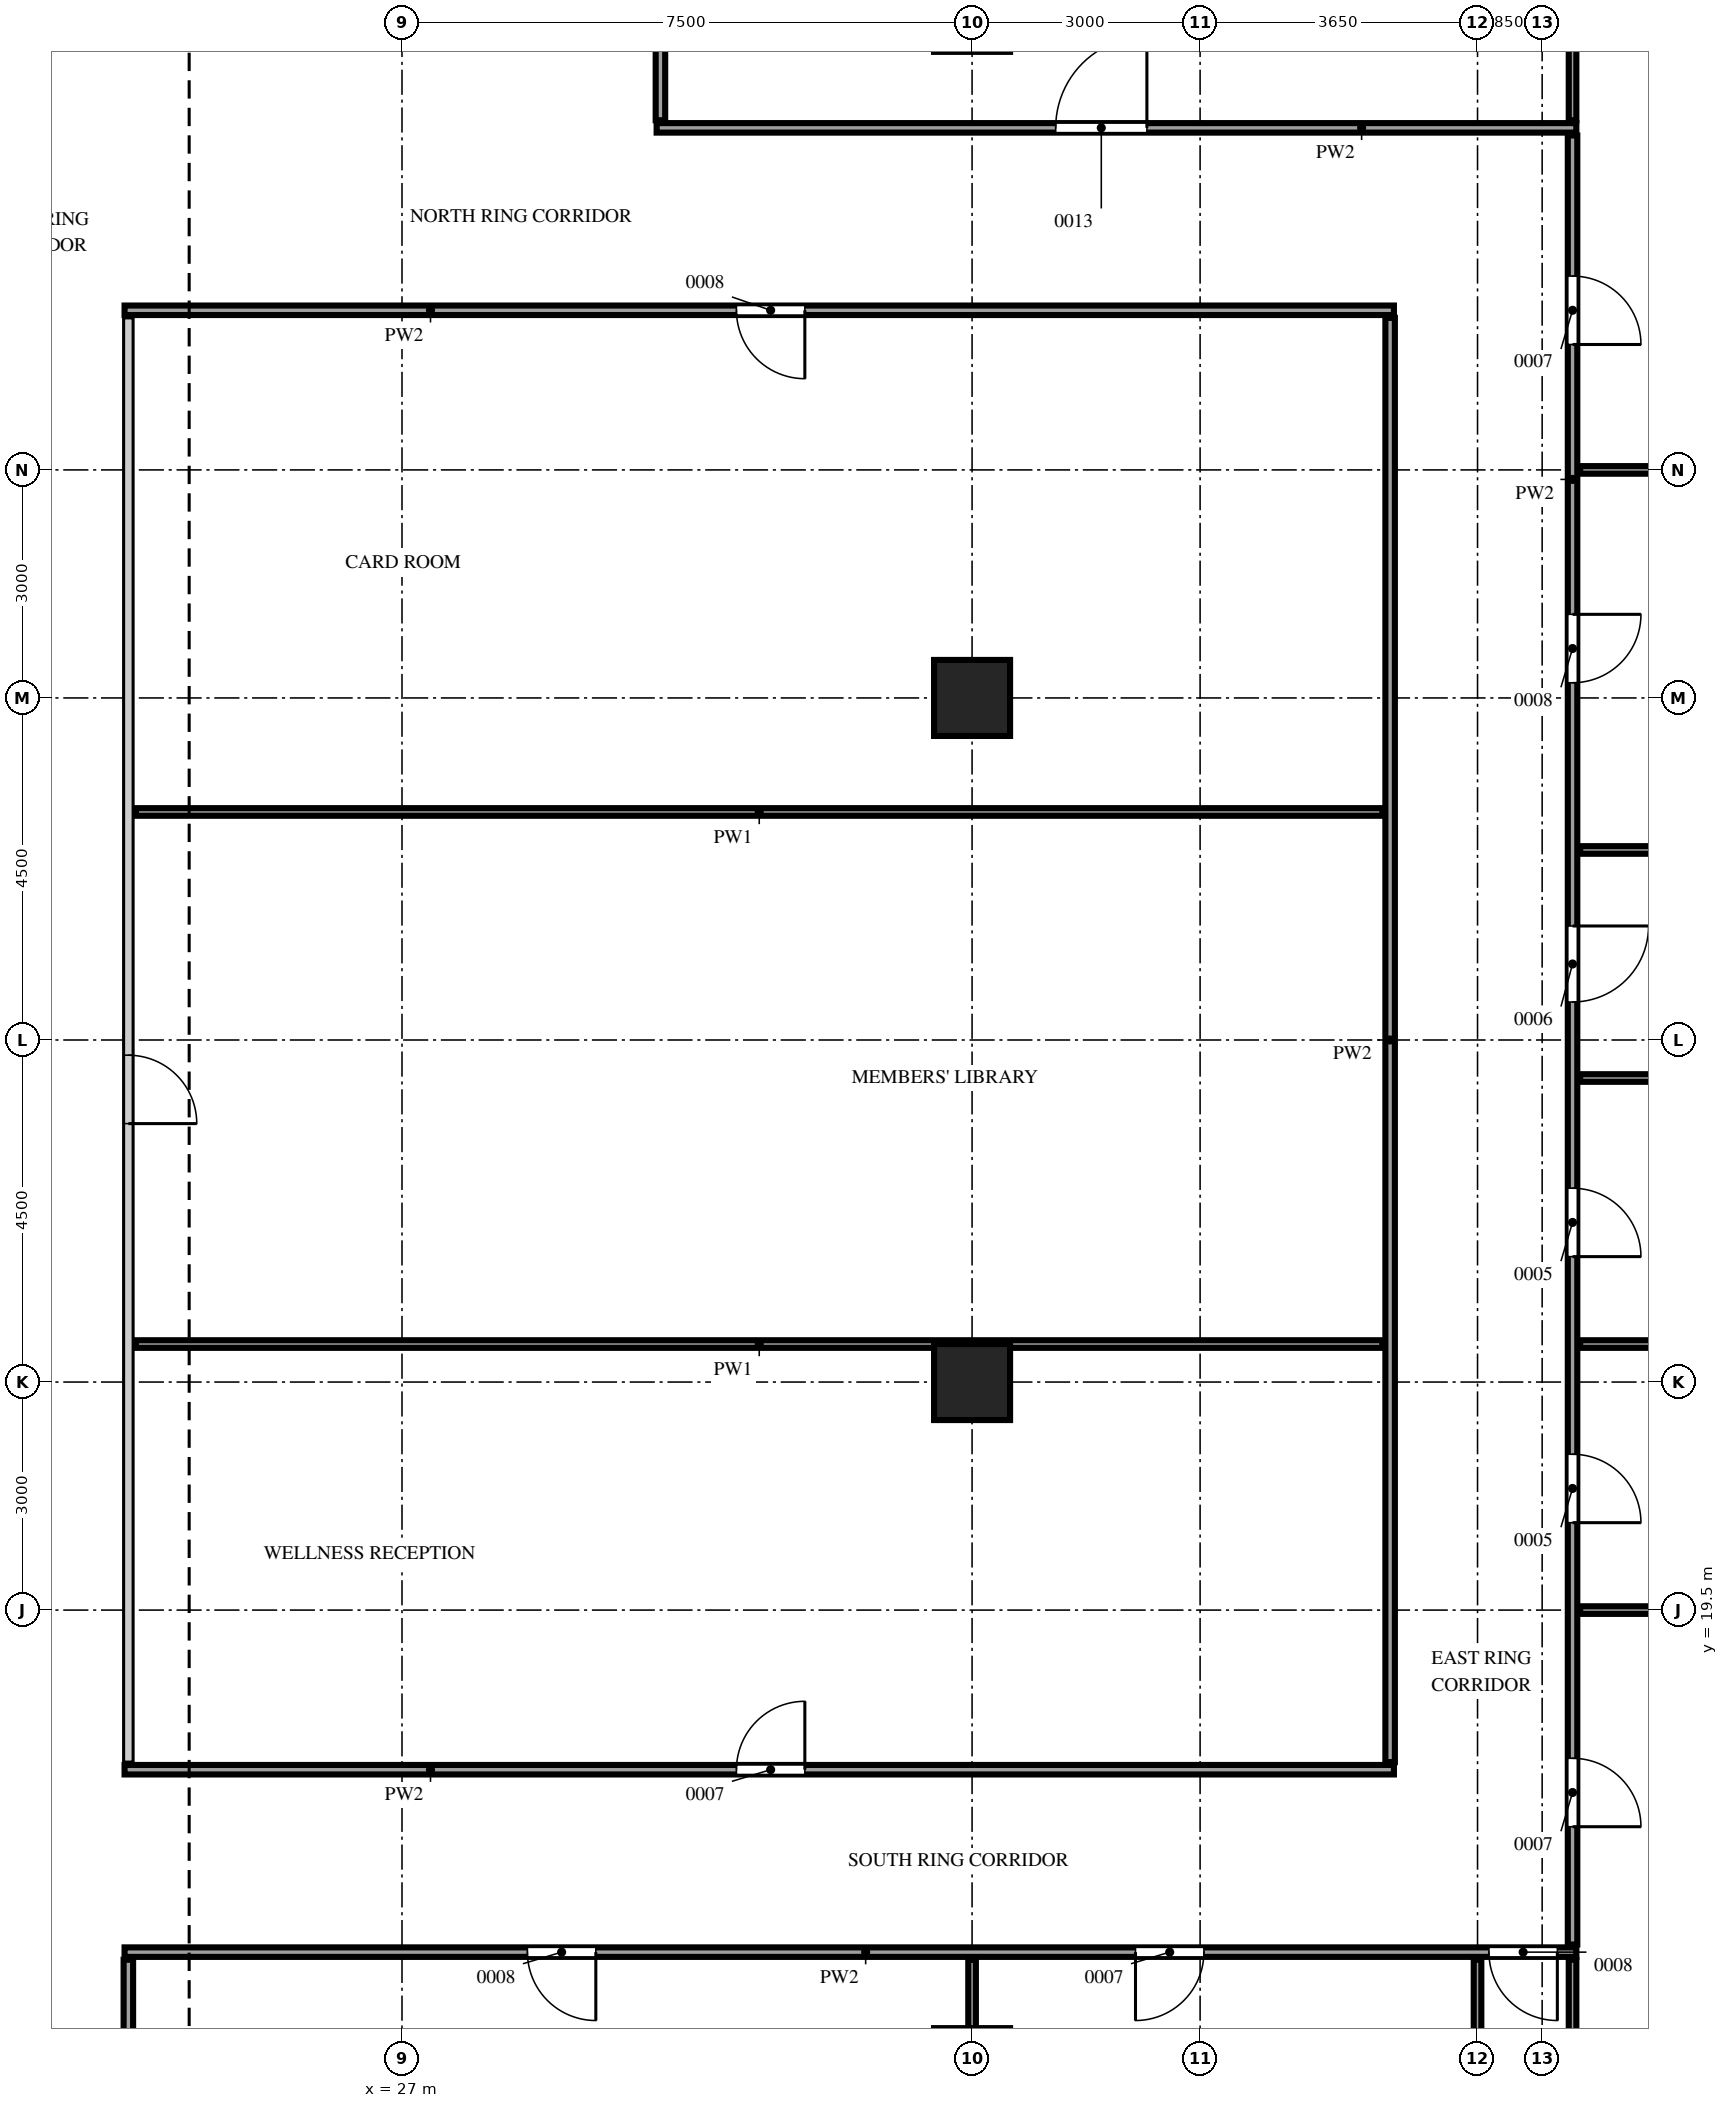
"""IFC4 building model, lengths in metres.
Left out: names, types, materials, properties, quantities, classifications, styles, units other than length and angle.
Written with IfcOpenShell. Run it as: python <this file> out.ifc"""

import sys

from ifc_helpers import new_model, si_unit, direction, frame, frame_2d, origin, origin_2d, place, context, subcontext, project, spatial, rectangle, extrude, source, transform, mapped, element, fill, save


model = new_model("IFC4")
c1 = context("Model", 3, precision=1e-05, world=origin(), true_north=direction((0.0, 1.0)))
c2 = subcontext(c1, "Body", "Model", "MODEL_VIEW")
j1 = project(units=[si_unit("LENGTHUNIT", "METRE"), si_unit("PLANEANGLEUNIT", "RADIAN")], contexts=[c1])
p1 = place(None, origin())
s1 = spatial("IfcSite", under=j1, at=p1, CompositionType="ELEMENT")
p2 = place(p1, origin())
s2 = spatial("IfcBuilding", under=s1, at=p2, CompositionType="ELEMENT")
p3 = place(p2, frame((0.0, 0.0, 298.2)))
s3 = spatial("IfcBuildingStorey", under=s2, at=p3, CompositionType="ELEMENT", Elevation=298.2)
m1 = source(origin(), c2, "Body", "SweptSolid", [
    extrude(rectangle(XDim=1.0, YDim=1.0, at=origin_2d()), origin(), (0.0, 0.0, 1.0), 3.75),
])
for number, where, z_axis, x_axis in (
    (1, (34.5, 22.5, 0.0), (0.0, 0.0, 1.0), (1.0, 0.0, 0.0)),
    (2, (34.5, 31.5, 0.0), (0.0, 0.0, 1.0), (1.0, 0.0, 0.0)),
):
    element("IfcColumn", number, at=place(p3, frame(where, z_axis=z_axis, x_axis=x_axis)), inside=s3, PredefinedType="COLUMN", context=c2, shape_type="MappedRepresentation", body=[
        mapped(m1, transform((0.0, 0.0, 0.0))),
    ])
m2 = source(origin(), c2, "Body", "SweptSolid", [
    extrude(rectangle(XDim=8.75, YDim=0.125, at=frame_2d((4.375, 0.0))), origin(), (0.0, 0.0, 1.0), 3.8),
])
p4 = place(p3, frame((23.4, 6.15, 0.0), z_axis=(0.0, 0.0, 1.0), x_axis=(0.0, 1.0, 0.0)))
e3 = element("IfcWall", 3, at=p4, inside=s3, PredefinedType="PARTITIONING", context=c2, shape_type="MappedRepresentation", body=[
    mapped(m2, transform((0.0, 0.0, 0.0))),
])
m3 = source(origin(), c2, "Body", "SweptSolid", [
    extrude(rectangle(XDim=8.75, YDim=0.1, at=frame_2d((4.375, 0.0))), origin(), (0.0, 0.0, 1.0), 3.35),
])
for number, where, z_axis, x_axis in (
    (4, (34.5, 6.15, 0.0), (0.0, 0.0, 1.0), (0.0, 1.0, 0.0)),
    (5, (41.15, 6.15, 0.0), (0.0, 0.0, 1.0), (0.0, 1.0, 0.0)),
):
    element("IfcWall", number, at=place(p3, frame(where, z_axis=z_axis, x_axis=x_axis)), inside=s3, PredefinedType="PARTITIONING", context=c2, shape_type="MappedRepresentation", body=[
        mapped(m3, transform((0.0, 0.0, 0.0))),
    ])
m4 = source(origin(), c2, "Body", "SweptSolid", [
    extrude(rectangle(XDim=2.75, YDim=0.1, at=frame_2d((1.375, 0.0))), origin(), (0.0, 0.0, 1.0), 3.8),
])
p5 = place(p3, frame((42.4, 12.15, 0.0), z_axis=(0.0, 0.0, 1.0), x_axis=(0.0, 1.0, 0.0)))
e6 = element("IfcWall", 6, at=p5, inside=s3, PredefinedType="PARTITIONING", context=c2, shape_type="MappedRepresentation", body=[
    mapped(m4, transform((0.0, 0.0, 0.0))),
])
m5 = source(origin(), c2, "Body", "SweptSolid", [
    extrude(rectangle(XDim=19.1, YDim=0.125, at=frame_2d((9.55, 0.0))), origin(), (0.0, 0.0, 1.0), 3.8),
])
p6 = place(p3, frame((23.35, 15.0, 0.0), z_axis=(0.0, 0.0, 1.0), x_axis=(1.0, 0.0, 0.0)))
e7 = element("IfcWall", 7, at=p6, inside=s3, PredefinedType="PARTITIONING", context=c2, shape_type="MappedRepresentation", body=[
    mapped(m5, transform((0.0, 0.0, 0.0))),
])
m6 = source(origin(), c2, "Body", "SweptSolid", [
    extrude(rectangle(XDim=0.9, YDim=2.1, at=frame_2d((0.45, 1.05))), frame((0.0, 0.073, 0.0), z_axis=(0.0, -1.0, 0.0), x_axis=(1.0, 0.0, 0.0)), (0.0, 0.0, 1.0), 0.145),
])
p7 = place(p6, frame((5.3, 0.0, 0.0)))
e8 = element("IfcOpeningElement", 8, at=p7, cuts=e7, PredefinedType="OPENING", context=c2, shape_type="MappedRepresentation", body=[
    mapped(m6, transform((0.0, 0.0, 0.0))),
])
p8 = place(p6, frame((13.3, 0.0, 0.0)))
e9 = element("IfcOpeningElement", 9, at=p8, cuts=e7, PredefinedType="OPENING", context=c2, shape_type="MappedRepresentation", body=[
    mapped(m6, transform((0.0, 0.0, 0.0))),
])
p9 = place(p6, frame((17.95, 0.0, 0.0)))
e10 = element("IfcOpeningElement", 10, at=p9, cuts=e7, PredefinedType="OPENING", context=c2, shape_type="MappedRepresentation", body=[
    mapped(m6, transform((0.0, 0.0, 0.0))),
])
m7 = source(origin(), c2, "Body", "SweptSolid", [
    extrude(rectangle(XDim=23.8, YDim=0.125, at=frame_2d((11.9, 0.0))), origin(), (0.0, 0.0, 1.0), 3.8),
])
p10 = place(p3, frame((42.4, 15.1, 0.0), z_axis=(0.0, 0.0, 1.0), x_axis=(0.0, 1.0, 0.0)))
e11 = element("IfcWall", 11, at=p10, inside=s3, PredefinedType="PARTITIONING", context=c2, shape_type="MappedRepresentation", body=[
    mapped(m7, transform((0.0, 0.0, 0.0))),
])
p11 = place(p10, frame((1.55, 0.0, 0.0)))
e12 = element("IfcOpeningElement", 12, at=p11, cuts=e11, PredefinedType="OPENING", context=c2, shape_type="MappedRepresentation", body=[
    mapped(m6, transform((0.0, 0.0, 0.0))),
])
p12 = place(p10, frame((5.55, 0.0, 0.0)))
e13 = element("IfcOpeningElement", 13, at=p12, cuts=e11, PredefinedType="OPENING", context=c2, shape_type="MappedRepresentation", body=[
    mapped(m6, transform((0.0, 0.0, 0.0))),
])
p13 = place(p10, frame((9.05, 0.0, 0.0)))
e14 = element("IfcOpeningElement", 14, at=p13, cuts=e11, PredefinedType="OPENING", context=c2, shape_type="MappedRepresentation", body=[
    mapped(m6, transform((0.0, 0.0, 0.0))),
])
m8 = source(origin(), c2, "Body", "SweptSolid", [
    extrude(rectangle(XDim=1.0, YDim=2.1, at=frame_2d((0.5, 1.05))), frame((0.0, 0.073, 0.0), z_axis=(0.0, -1.0, 0.0), x_axis=(1.0, 0.0, 0.0)), (0.0, 0.0, 1.0), 0.145),
])
p14 = place(p10, frame((12.4, 0.0, 0.0)))
e15 = element("IfcOpeningElement", 15, at=p14, cuts=e11, PredefinedType="OPENING", context=c2, shape_type="MappedRepresentation", body=[
    mapped(m8, transform((0.0, 0.0, 0.0))),
])
p15 = place(p10, frame((16.6, 0.0, 0.0)))
e16 = element("IfcOpeningElement", 16, at=p15, cuts=e11, PredefinedType="OPENING", context=c2, shape_type="MappedRepresentation", body=[
    mapped(m6, transform((0.0, 0.0, 0.0))),
])
p16 = place(p10, frame((21.05, 0.0, 0.0)))
e17 = element("IfcOpeningElement", 17, at=p16, cuts=e11, PredefinedType="OPENING", context=c2, shape_type="MappedRepresentation", body=[
    mapped(m6, transform((0.0, 0.0, 0.0))),
])
m9 = source(origin(), c2, "Body", "SweptSolid", [
    extrude(rectangle(XDim=16.7, YDim=0.125, at=frame_2d((8.35, 0.0))), origin(), (0.0, 0.0, 1.0), 3.8),
])
p17 = place(p3, frame((23.35, 17.4, 0.0), z_axis=(0.0, 0.0, 1.0), x_axis=(1.0, 0.0, 0.0)))
e18 = element("IfcWall", 18, at=p17, inside=s3, PredefinedType="PARTITIONING", context=c2, shape_type="MappedRepresentation", body=[
    mapped(m9, transform((0.0, 0.0, 0.0))),
])
p18 = place(p17, frame((8.05, 0.0, 0.0)))
e19 = element("IfcOpeningElement", 19, at=p18, cuts=e18, PredefinedType="OPENING", context=c2, shape_type="MappedRepresentation", body=[
    mapped(m6, transform((0.0, 0.0, 0.0))),
])
m10 = source(origin(), c2, "Body", "SweptSolid", [
    extrude(rectangle(XDim=19.0, YDim=0.125, at=frame_2d((9.5, 0.0))), origin(), (0.0, 0.0, 1.0), 3.8),
])
p19 = place(p3, frame((23.4, 17.5, 0.0), z_axis=(0.0, 0.0, 1.0), x_axis=(0.0, 1.0, 0.0)))
e20 = element("IfcWall", 20, at=p19, inside=s3, PredefinedType="PARTITIONING", context=c2, shape_type="MappedRepresentation", body=[
    mapped(m10, transform((0.0, 0.0, 0.0))),
])
p20 = place(p19, frame((8.4, 0.0, 0.0)))
e21 = element("IfcOpeningElement", 21, at=p20, cuts=e20, PredefinedType="OPENING", context=c2, shape_type="MappedRepresentation", body=[
    mapped(m6, transform((0.0, 0.0, 0.0))),
])
p21 = place(p3, frame((40.0, 17.5, 0.0), z_axis=(0.0, 0.0, 1.0), x_axis=(0.0, 1.0, 0.0)))
e22 = element("IfcWall", 22, at=p21, inside=s3, PredefinedType="PARTITIONING", context=c2, shape_type="MappedRepresentation", body=[
    mapped(m10, transform((0.0, 0.0, 0.0))),
])
m11 = source(origin(), c2, "Body", "SweptSolid", [
    extrude(rectangle(XDim=5.35, YDim=0.1, at=frame_2d((2.675, 0.0))), origin(), (0.0, 0.0, 1.0), 3.8),
])
p22 = place(p3, frame((42.5, 19.5, 0.0), z_axis=(0.0, 0.0, 1.0), x_axis=(1.0, 0.0, 0.0)))
e23 = element("IfcWall", 23, at=p22, inside=s3, PredefinedType="PARTITIONING", context=c2, shape_type="MappedRepresentation", body=[
    mapped(m11, transform((0.0, 0.0, 0.0))),
])
m12 = source(origin(), c2, "Body", "SweptSolid", [
    extrude(rectangle(XDim=16.4, YDim=0.1, at=frame_2d((8.2, 0.0))), origin(), (0.0, 0.0, 1.0), 3.8),
])
p23 = place(p3, frame((23.5, 23.0, 0.0), z_axis=(0.0, 0.0, 1.0), x_axis=(1.0, 0.0, 0.0)))
e24 = element("IfcWall", 24, at=p23, inside=s3, PredefinedType="PARTITIONING", context=c2, shape_type="MappedRepresentation", body=[
    mapped(m12, transform((0.0, 0.0, 0.0))),
])
for number, where, z_axis, x_axis in (
    (25, (42.5, 23.0, 0.0), (0.0, 0.0, 1.0), (1.0, 0.0, 0.0)),
    (26, (42.5, 26.5, 0.0), (0.0, 0.0, 1.0), (1.0, 0.0, 0.0)),
    (27, (42.5, 29.5, 0.0), (0.0, 0.0, 1.0), (1.0, 0.0, 0.0)),
):
    element("IfcWall", number, at=place(p3, frame(where, z_axis=z_axis, x_axis=x_axis)), inside=s3, PredefinedType="PARTITIONING", context=c2, shape_type="MappedRepresentation", body=[
        mapped(m11, transform((0.0, 0.0, 0.0))),
    ])
p24 = place(p3, frame((23.5, 30.0, 0.0), z_axis=(0.0, 0.0, 1.0), x_axis=(1.0, 0.0, 0.0)))
e28 = element("IfcWall", 28, at=p24, inside=s3, PredefinedType="PARTITIONING", context=c2, shape_type="MappedRepresentation", body=[
    mapped(m12, transform((0.0, 0.0, 0.0))),
])
p25 = place(p3, frame((42.5, 34.5, 0.0), z_axis=(0.0, 0.0, 1.0), x_axis=(1.0, 0.0, 0.0)))
e29 = element("IfcWall", 29, at=p25, inside=s3, PredefinedType="PARTITIONING", context=c2, shape_type="MappedRepresentation", body=[
    mapped(m11, transform((0.0, 0.0, 0.0))),
])
p26 = place(p3, frame((23.35, 36.6, 0.0), z_axis=(0.0, 0.0, 1.0), x_axis=(1.0, 0.0, 0.0)))
e30 = element("IfcWall", 30, at=p26, inside=s3, PredefinedType="PARTITIONING", context=c2, shape_type="MappedRepresentation", body=[
    mapped(m9, transform((0.0, 0.0, 0.0))),
])
p27 = place(p26, frame((8.05, 0.0, 0.0)))
e31 = element("IfcOpeningElement", 31, at=p27, cuts=e30, PredefinedType="OPENING", context=c2, shape_type="MappedRepresentation", body=[
    mapped(m6, transform((0.0, 0.0, 0.0))),
])
m13 = source(origin(), c2, "Body", "SweptSolid", [
    extrude(rectangle(XDim=12.1, YDim=0.125, at=frame_2d((6.05, 0.0))), origin(), (0.0, 0.0, 1.0), 3.8),
])
p28 = place(p3, frame((30.35, 39.0, 0.0), z_axis=(0.0, 0.0, 1.0), x_axis=(1.0, 0.0, 0.0)))
e32 = element("IfcWall", 32, at=p28, inside=s3, PredefinedType="PARTITIONING", context=c2, shape_type="MappedRepresentation", body=[
    mapped(m13, transform((0.0, 0.0, 0.0))),
])
m14 = source(origin(), c2, "Body", "SweptSolid", [
    extrude(rectangle(XDim=1.2, YDim=2.1, at=frame_2d((0.6, 1.05))), frame((0.0, 0.073, 0.0), z_axis=(0.0, -1.0, 0.0), x_axis=(1.0, 0.0, 0.0)), (0.0, 0.0, 1.0), 0.145),
])
p29 = place(p28, frame((5.25, 0.0, 0.0)))
e33 = element("IfcOpeningElement", 33, at=p29, cuts=e32, PredefinedType="OPENING", context=c2, shape_type="MappedRepresentation", body=[
    mapped(m14, transform((0.0, 0.0, 0.0))),
])
p30 = place(p3, frame((30.4, 39.1, 0.0), z_axis=(0.0, 0.0, 1.0), x_axis=(0.0, 1.0, 0.0)))
e34 = element("IfcWall", 34, at=p30, inside=s3, PredefinedType="PARTITIONING", context=c2, shape_type="MappedRepresentation", body=[
    mapped(m2, transform((0.0, 0.0, 0.0))),
])
p31 = place(p3, frame((42.4, 39.1, 0.0), z_axis=(0.0, 0.0, 1.0), x_axis=(0.0, 1.0, 0.0)))
e35 = element("IfcWall", 35, at=p31, inside=s3, PredefinedType="PARTITIONING", context=c2, shape_type="MappedRepresentation", body=[
    mapped(m4, transform((0.0, 0.0, 0.0))),
])
m15 = source(origin(), c2, "Body", "SweptSolid", [
    extrude(rectangle(XDim=0.9, YDim=2.1, at=frame_2d((0.45, 1.05))), frame((0.0, 0.025, 0.0), z_axis=(0.0, -1.0, 0.0), x_axis=(1.0, 0.0, 0.0)), (0.0, 0.0, 1.0), 0.05),
])
p32 = place(p7, origin())
e36 = element("IfcDoor", 36, at=p32, inside=s3, OperationType="SINGLE_SWING_RIGHT", PredefinedType="DOOR", context=c2, shape_type="MappedRepresentation", body=[
    mapped(m15, transform((0.0, 0.0, 0.0))),
])
fill(e8, e36)
p33 = place(p8, origin())
e37 = element("IfcDoor", 37, at=p33, inside=s3, OperationType="SINGLE_SWING_LEFT", PredefinedType="DOOR", context=c2, shape_type="MappedRepresentation", body=[
    mapped(m15, transform((0.0, 0.0, 0.0))),
])
fill(e9, e37)
p34 = place(p9, origin())
e38 = element("IfcDoor", 38, at=p34, inside=s3, OperationType="SINGLE_SWING_RIGHT", PredefinedType="DOOR", context=c2, shape_type="MappedRepresentation", body=[
    mapped(m15, transform((0.0, 0.0, 0.0))),
])
fill(e10, e38)
p35 = place(p11, origin())
e39 = element("IfcDoor", 39, at=p35, inside=s3, OperationType="SINGLE_SWING_LEFT", PredefinedType="DOOR", context=c2, shape_type="MappedRepresentation", body=[
    mapped(m15, transform((0.0, 0.0, 0.0))),
])
fill(e12, e39)
p36 = place(p12, origin())
e40 = element("IfcDoor", 40, at=p36, inside=s3, OperationType="SINGLE_SWING_LEFT", PredefinedType="DOOR", context=c2, shape_type="MappedRepresentation", body=[
    mapped(m15, transform((0.0, 0.0, 0.0))),
])
fill(e13, e40)
p37 = place(p13, origin())
e41 = element("IfcDoor", 41, at=p37, inside=s3, OperationType="SINGLE_SWING_LEFT", PredefinedType="DOOR", context=c2, shape_type="MappedRepresentation", body=[
    mapped(m15, transform((0.0, 0.0, 0.0))),
])
fill(e14, e41)
m16 = source(origin(), c2, "Body", "SweptSolid", [
    extrude(rectangle(XDim=1.0, YDim=2.1, at=frame_2d((0.5, 1.05))), frame((0.0, 0.025, 0.0), z_axis=(0.0, -1.0, 0.0), x_axis=(1.0, 0.0, 0.0)), (0.0, 0.0, 1.0), 0.05),
])
p38 = place(p14, origin())
e42 = element("IfcDoor", 42, at=p38, inside=s3, OperationType="SINGLE_SWING_RIGHT", PredefinedType="DOOR", context=c2, shape_type="MappedRepresentation", body=[
    mapped(m16, transform((0.0, 0.0, 0.0))),
])
fill(e15, e42)
p39 = place(p15, origin())
e43 = element("IfcDoor", 43, at=p39, inside=s3, OperationType="SINGLE_SWING_RIGHT", PredefinedType="DOOR", context=c2, shape_type="MappedRepresentation", body=[
    mapped(m15, transform((0.0, 0.0, 0.0))),
])
fill(e16, e43)
p40 = place(p16, origin())
e44 = element("IfcDoor", 44, at=p40, inside=s3, OperationType="SINGLE_SWING_LEFT", PredefinedType="DOOR", context=c2, shape_type="MappedRepresentation", body=[
    mapped(m15, transform((0.0, 0.0, 0.0))),
])
fill(e17, e44)
m17 = source(origin(), c2, "Body", "SweptSolid", [
    extrude(rectangle(XDim=1.2, YDim=2.1, at=frame_2d((0.6, 1.05))), frame((0.0, 0.025, 0.0), z_axis=(0.0, -1.0, 0.0), x_axis=(1.0, 0.0, 0.0)), (0.0, 0.0, 1.0), 0.05),
])
p41 = place(p29, origin())
e45 = element("IfcDoor", 45, at=p41, inside=s3, OperationType="SINGLE_SWING_LEFT", PredefinedType="DOOR", context=c2, shape_type="MappedRepresentation", body=[
    mapped(m17, transform((0.0, 0.0, 0.0))),
])
fill(e33, e45)
p42 = place(p18, origin())
e46 = element("IfcDoor", 46, at=p42, inside=s3, OperationType="SINGLE_SWING_LEFT", PredefinedType="DOOR", context=c2, shape_type="MappedRepresentation", body=[
    mapped(m15, transform((0.0, 0.0, 0.0))),
])
fill(e19, e46)
p43 = place(p20, origin())
e47 = element("IfcDoor", 47, at=p43, inside=s3, OperationType="SINGLE_SWING_LEFT", PredefinedType="DOOR", context=c2, shape_type="MappedRepresentation", body=[
    mapped(m15, transform((0.0, 0.0, 0.0))),
])
fill(e21, e47)
p44 = place(p27, origin())
e48 = element("IfcDoor", 48, at=p44, inside=s3, OperationType="SINGLE_SWING_RIGHT", PredefinedType="DOOR", context=c2, shape_type="MappedRepresentation", body=[
    mapped(m15, transform((0.0, 0.0, 0.0))),
])
fill(e31, e48)
save(model, sys.argv[1])
